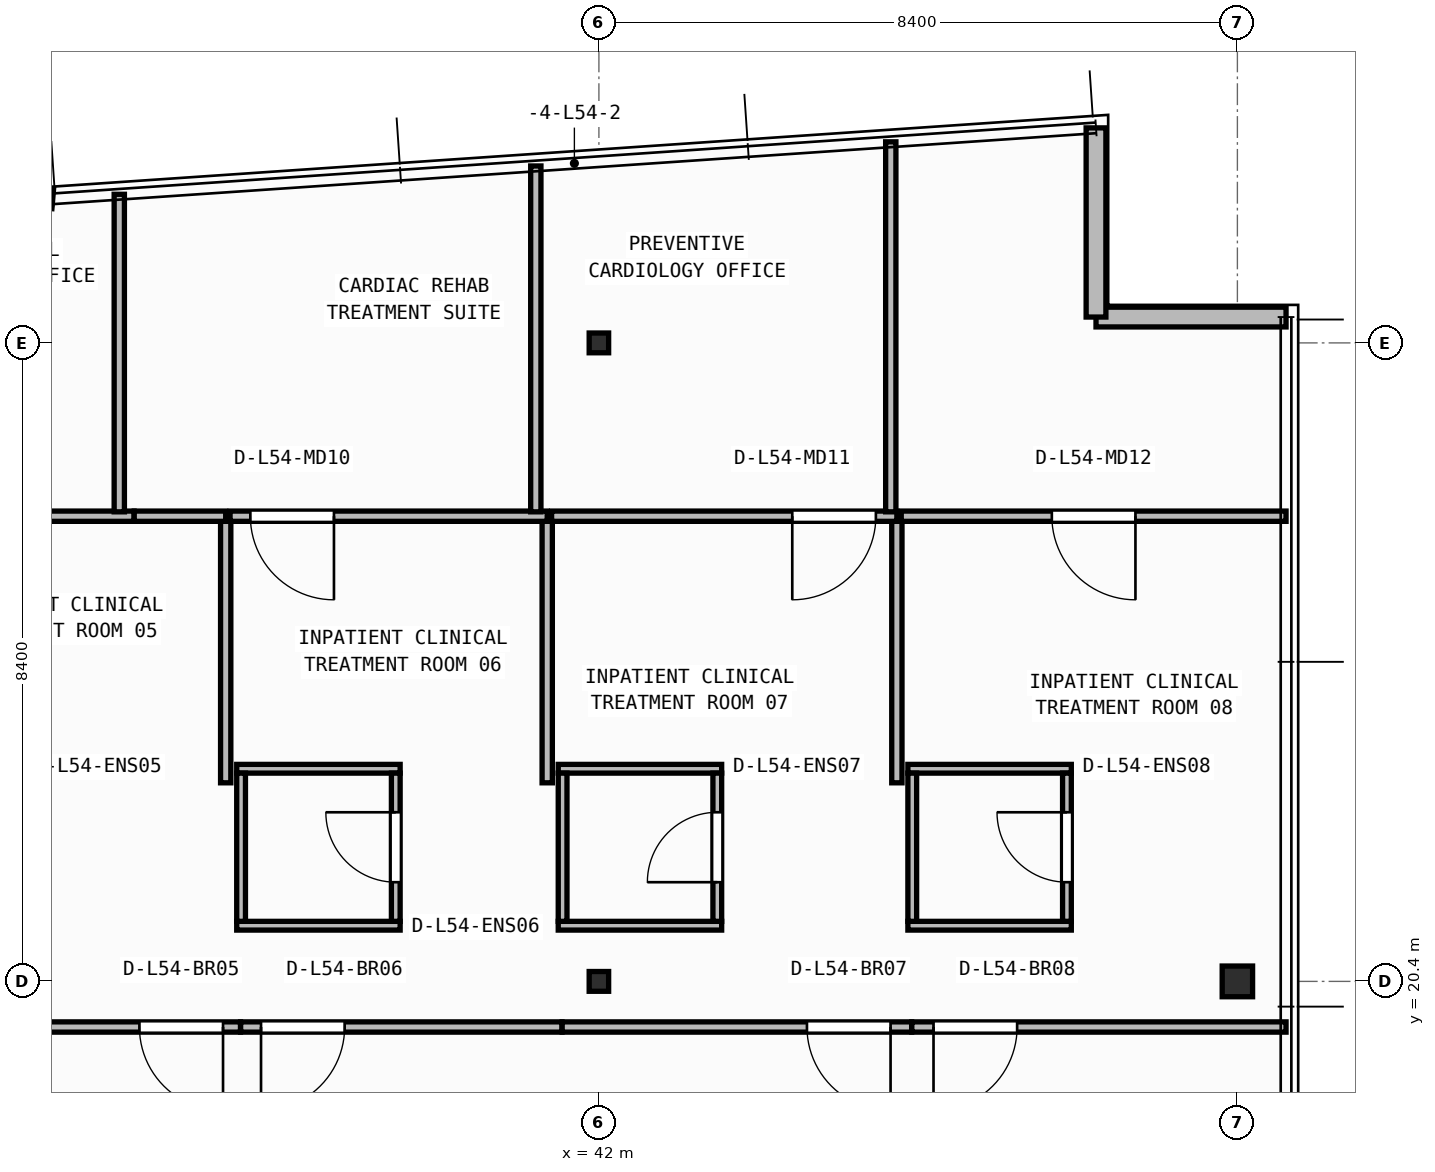
"""IFC4 building model, lengths in metres.
Left out: names, types, materials, properties, quantities, classifications, styles, units other than length and angle.
Written with IfcOpenShell. Run it as: python <this file> out.ifc"""

import sys

from ifc_helpers import new_model, si_unit, direction, frame, frame_2d, origin, origin_2d, place, context, subcontext, project, spatial, rectangle, i_section, extrude, element, fill, save


model = new_model("IFC4")
c1 = context("Model", 3, precision=1e-05, world=origin(), true_north=direction((0.0, 1.0)))
c2 = subcontext(c1, "Body", "Model", "MODEL_VIEW")
j1 = project(units=[si_unit("LENGTHUNIT", "METRE"), si_unit("PLANEANGLEUNIT", "RADIAN")], contexts=[c1])
p1 = place(None, origin())
s1 = spatial("IfcSite", under=j1, at=p1, CompositionType="ELEMENT")
p2 = place(p1, origin())
s2 = spatial("IfcBuilding", under=s1, at=p2, CompositionType="ELEMENT")
p3 = place(p2, frame((0.0, 0.0, 219.75)))
s3 = spatial("IfcBuildingStorey", under=s2, at=p3, CompositionType="ELEMENT", Elevation=219.75)
p4 = place(p3, frame((42.0, 20.4, 0.0), z_axis=(0.0, 0.0, 1.0), x_axis=(1.0, 0.0, 0.0)))
e1 = element("IfcColumn", 1, at=p4, inside=s3, PredefinedType="COLUMN", context=c2, shape_type="SweptSolid", body=[
    extrude(i_section(OverallWidth=0.256, OverallDepth=0.26, WebThickness=0.01, FlangeThickness=0.017, FilletRadius=0.013, at=origin_2d()), origin(), (0.0, 0.0, 1.0), 3.95),
])
p5 = place(p3, frame((50.4, 20.4, 0.0), z_axis=(0.0, 0.0, 1.0), x_axis=(1.0, 0.0, 0.0)))
e2 = element("IfcColumn", 2, at=p5, inside=s3, PredefinedType="COLUMN", context=c2, shape_type="SweptSolid", body=[
    extrude(i_section(OverallWidth=0.4, OverallDepth=0.404, WebThickness=0.02, FlangeThickness=0.032, at=origin_2d()), origin(), (0.0, 0.0, 1.0), 3.95),
])
p6 = place(p3, frame((42.0, 28.8, 0.0), z_axis=(0.0, 0.0, 1.0), x_axis=(1.0, 0.0, 0.0)))
e3 = element("IfcColumn", 3, at=p6, inside=s3, PredefinedType="COLUMN", context=c2, shape_type="SweptSolid", body=[
    extrude(i_section(OverallWidth=0.256, OverallDepth=0.26, WebThickness=0.01, FlangeThickness=0.017, FilletRadius=0.013, at=origin_2d()), origin(), (0.0, 0.0, 1.0), 3.95),
])
p7 = place(p3, frame((51.04, 29.14, 0.0), z_axis=(0.0, 0.0, 1.0), x_axis=(-1.0, 0.0, 0.0)))
e4 = element("IfcWall", 4, at=p7, inside=s3, PredefinedType="STANDARD", context=c2, shape_type="SweptSolid", body=[
    extrude(rectangle(XDim=2.5, YDim=0.26, at=frame_2d((1.25, 0.0))), origin(), (0.0, 0.0, 1.0), 3.71),
])
p8 = place(p3, frame((48.54, 29.14, 0.0), z_axis=(0.0, 0.0, 1.0), x_axis=(0.0, 1.0, 0.0)))
e5 = element("IfcWall", 5, at=p8, inside=s3, PredefinedType="STANDARD", context=c2, shape_type="SweptSolid", body=[
    extrude(rectangle(XDim=2.489, YDim=0.26, at=frame_2d((1.245, 0.0))), origin(), (0.0, 0.0, 1.0), 3.71),
])
p9 = place(p3, frame((34.815, 30.696, 0.0), z_axis=(0.0, 0.0, 1.0), x_axis=(-0.996454704935, 0.084130975344, 0.0)))
e6 = element("IfcWall", 6, at=p9, inside=s3, PredefinedType="STANDARD", context=c2, shape_type="SweptSolid", body=[
    extrude(rectangle(XDim=13.401, YDim=0.26, at=frame_2d((6.701, 0.0))), origin(), (0.0, 0.0, 1.0), 3.71),
])
p10 = place(p9, frame((5.5, 0.0, 0.9)))
e7 = element("IfcOpeningElement", 7, at=p10, cuts=e6, PredefinedType="OPENING", context=c2, shape_type="SweptSolid", body=[
    extrude(rectangle(XDim=2.4, YDim=1.65, at=frame_2d((1.2, 0.825))), frame((0.0, 0.14, 0.0), z_axis=(0.0, -1.0, 0.0), x_axis=(1.0, 0.0, 0.0)), (0.0, 0.0, 1.0), 0.28),
])
for number, where, z_axis, x_axis in (
    (8, (37.235, 21.133, 0.0), (0.0, 0.0, 1.0), (1.0, 0.0, 0.0)),
    (9, (37.235, 23.198, 0.0), (0.0, 0.0, 1.0), (1.0, 0.0, 0.0)),
):
    element("IfcWall", number, at=place(p3, frame(where, z_axis=z_axis, x_axis=x_axis)), inside=s3, PredefinedType="PARTITIONING", context=c2, shape_type="SweptSolid", body=[
        extrude(rectangle(XDim=2.15, YDim=0.115, at=frame_2d((1.075, 0.0))), origin(), (0.0, 0.0, 1.0), 3.71),
    ])
p11 = place(p3, frame((37.292, 21.19, 0.0), z_axis=(0.0, 0.0, 1.0), x_axis=(0.0, 1.0, 0.0)))
e10 = element("IfcWall", 10, at=p11, inside=s3, PredefinedType="PARTITIONING", context=c2, shape_type="SweptSolid", body=[
    extrude(rectangle(XDim=1.95, YDim=0.115, at=frame_2d((0.975, 0.0))), origin(), (0.0, 0.0, 1.0), 3.71),
])
p12 = place(p3, frame((39.327, 21.19, 0.0), z_axis=(0.0, 0.0, 1.0), x_axis=(0.0, 1.0, 0.0)))
e11 = element("IfcWall", 11, at=p12, inside=s3, PredefinedType="PARTITIONING", context=c2, shape_type="SweptSolid", body=[
    extrude(rectangle(XDim=1.95, YDim=0.115, at=frame_2d((0.975, 0.0))), origin(), (0.0, 0.0, 1.0), 3.71),
])
p13 = place(p12, frame((0.515, 0.0, 0.0)))
e12 = element("IfcOpeningElement", 12, at=p13, cuts=e11, PredefinedType="OPENING", context=c2, shape_type="SweptSolid", body=[
    extrude(rectangle(XDim=0.92, YDim=2.1, at=frame_2d((0.46, 1.05))), frame((0.0, 0.067, 0.0), z_axis=(0.0, -1.0, 0.0), x_axis=(1.0, 0.0, 0.0)), (0.0, 0.0, 1.0), 0.135),
])
for number, where, z_axis, x_axis in (
    (13, (41.465, 21.133, 0.0), (0.0, 0.0, 1.0), (1.0, 0.0, 0.0)),
    (14, (41.465, 23.198, 0.0), (0.0, 0.0, 1.0), (1.0, 0.0, 0.0)),
):
    element("IfcWall", number, at=place(p3, frame(where, z_axis=z_axis, x_axis=x_axis)), inside=s3, PredefinedType="PARTITIONING", context=c2, shape_type="SweptSolid", body=[
        extrude(rectangle(XDim=2.15, YDim=0.115, at=frame_2d((1.075, 0.0))), origin(), (0.0, 0.0, 1.0), 3.71),
    ])
p14 = place(p3, frame((41.522, 21.19, 0.0), z_axis=(0.0, 0.0, 1.0), x_axis=(0.0, 1.0, 0.0)))
e15 = element("IfcWall", 15, at=p14, inside=s3, PredefinedType="PARTITIONING", context=c2, shape_type="SweptSolid", body=[
    extrude(rectangle(XDim=1.95, YDim=0.115, at=frame_2d((0.975, 0.0))), origin(), (0.0, 0.0, 1.0), 3.157),
])
p15 = place(p3, frame((43.558, 21.19, 0.0), z_axis=(0.0, 0.0, 1.0), x_axis=(0.0, 1.0, 0.0)))
e16 = element("IfcWall", 16, at=p15, inside=s3, PredefinedType="PARTITIONING", context=c2, shape_type="SweptSolid", body=[
    extrude(rectangle(XDim=1.95, YDim=0.115, at=frame_2d((0.975, 0.0))), origin(), (0.0, 0.0, 1.0), 3.71),
])
p16 = place(p15, frame((0.515, 0.0, 0.0)))
e17 = element("IfcOpeningElement", 17, at=p16, cuts=e16, PredefinedType="OPENING", context=c2, shape_type="SweptSolid", body=[
    extrude(rectangle(XDim=0.92, YDim=2.1, at=frame_2d((0.46, 1.05))), frame((0.0, 0.067, 0.0), z_axis=(0.0, -1.0, 0.0), x_axis=(1.0, 0.0, 0.0)), (0.0, 0.0, 1.0), 0.135),
])
for number, where, z_axis, x_axis in (
    (18, (46.065, 21.133, 0.0), (0.0, 0.0, 1.0), (1.0, 0.0, 0.0)),
    (19, (46.065, 23.198, 0.0), (0.0, 0.0, 1.0), (1.0, 0.0, 0.0)),
):
    element("IfcWall", number, at=place(p3, frame(where, z_axis=z_axis, x_axis=x_axis)), inside=s3, PredefinedType="PARTITIONING", context=c2, shape_type="SweptSolid", body=[
        extrude(rectangle(XDim=2.15, YDim=0.115, at=frame_2d((1.075, 0.0))), origin(), (0.0, 0.0, 1.0), 3.71),
    ])
p17 = place(p3, frame((46.123, 21.19, 0.0), z_axis=(0.0, 0.0, 1.0), x_axis=(0.0, 1.0, 0.0)))
e20 = element("IfcWall", 20, at=p17, inside=s3, PredefinedType="PARTITIONING", context=c2, shape_type="SweptSolid", body=[
    extrude(rectangle(XDim=1.95, YDim=0.115, at=frame_2d((0.975, 0.0))), origin(), (0.0, 0.0, 1.0), 3.71),
])
p18 = place(p3, frame((48.157, 21.19, 0.0), z_axis=(0.0, 0.0, 1.0), x_axis=(0.0, 1.0, 0.0)))
e21 = element("IfcWall", 21, at=p18, inside=s3, PredefinedType="PARTITIONING", context=c2, shape_type="SweptSolid", body=[
    extrude(rectangle(XDim=1.95, YDim=0.115, at=frame_2d((0.975, 0.0))), origin(), (0.0, 0.0, 1.0), 3.71),
])
p19 = place(p18, frame((0.515, 0.0, 0.0)))
e22 = element("IfcOpeningElement", 22, at=p19, cuts=e21, PredefinedType="OPENING", context=c2, shape_type="SweptSolid", body=[
    extrude(rectangle(XDim=0.92, YDim=2.1, at=frame_2d((0.46, 1.05))), frame((0.0, 0.067, 0.0), z_axis=(0.0, -1.0, 0.0), x_axis=(1.0, 0.0, 0.0)), (0.0, 0.0, 1.0), 0.135),
])
p20 = place(p3, frame((37.285, 19.8, 0.0), z_axis=(0.0, 0.0, 1.0), x_axis=(-1.0, 0.0, 0.0)))
e23 = element("IfcWall", 23, at=p20, inside=s3, PredefinedType="PARTITIONING", context=c2, shape_type="SweptSolid", body=[
    extrude(rectangle(XDim=2.687, YDim=0.135, at=frame_2d((1.344, 0.0))), origin(), (0.0, 0.0, 1.0), 3.71),
])
p21 = place(p20, frame((0.23, 0.0, 0.0)))
e24 = element("IfcOpeningElement", 24, at=p21, cuts=e23, PredefinedType="OPENING", context=c2, shape_type="SweptSolid", body=[
    extrude(rectangle(XDim=1.1, YDim=2.1, at=frame_2d((0.55, 1.05))), frame((0.0, 0.077, 0.0), z_axis=(0.0, -1.0, 0.0), x_axis=(1.0, 0.0, 0.0)), (0.0, 0.0, 1.0), 0.155),
])
p22 = place(p3, frame((41.515, 19.8, 0.0), z_axis=(0.0, 0.0, 1.0), x_axis=(-1.0, 0.0, 0.0)))
e25 = element("IfcWall", 25, at=p22, inside=s3, PredefinedType="PARTITIONING", context=c2, shape_type="SweptSolid", body=[
    extrude(rectangle(XDim=4.228, YDim=0.135, at=frame_2d((2.114, 0.0))), origin(), (0.0, 0.0, 1.0), 3.71),
])
p23 = place(p22, frame((2.86, 0.0, 0.0)))
e26 = element("IfcOpeningElement", 26, at=p23, cuts=e25, PredefinedType="OPENING", context=c2, shape_type="SweptSolid", body=[
    extrude(rectangle(XDim=1.1, YDim=2.1, at=frame_2d((0.55, 1.05))), frame((0.0, 0.077, 0.0), z_axis=(0.0, -1.0, 0.0), x_axis=(1.0, 0.0, 0.0)), (0.0, 0.0, 1.0), 0.155),
])
p24 = place(p3, frame((46.115, 19.8, 0.0), z_axis=(0.0, 0.0, 1.0), x_axis=(-1.0, 0.0, 0.0)))
e27 = element("IfcWall", 27, at=p24, inside=s3, PredefinedType="PARTITIONING", context=c2, shape_type="SweptSolid", body=[
    extrude(rectangle(XDim=4.598, YDim=0.135, at=frame_2d((2.299, 0.0))), origin(), (0.0, 0.0, 1.0), 3.71),
])
p25 = place(p24, frame((0.278, 0.0, 0.0)))
e28 = element("IfcOpeningElement", 28, at=p25, cuts=e27, PredefinedType="OPENING", context=c2, shape_type="SweptSolid", body=[
    extrude(rectangle(XDim=1.1, YDim=2.1, at=frame_2d((0.55, 1.05))), frame((0.0, 0.077, 0.0), z_axis=(0.0, -1.0, 0.0), x_axis=(1.0, 0.0, 0.0)), (0.0, 0.0, 1.0), 0.155),
])
p26 = place(p3, frame((51.04, 19.8, 0.0), z_axis=(0.0, 0.0, 1.0), x_axis=(-1.0, 0.0, 0.0)))
e29 = element("IfcWall", 29, at=p26, inside=s3, PredefinedType="PARTITIONING", context=c2, shape_type="SweptSolid", body=[
    extrude(rectangle(XDim=4.923, YDim=0.135, at=frame_2d((2.462, 0.0))), origin(), (0.0, 0.0, 1.0), 3.71),
])
p27 = place(p26, frame((3.538, 0.0, 0.0)))
e30 = element("IfcOpeningElement", 30, at=p27, cuts=e29, PredefinedType="OPENING", context=c2, shape_type="SweptSolid", body=[
    extrude(rectangle(XDim=1.1, YDim=2.1, at=frame_2d((0.55, 1.05))), frame((0.0, 0.077, 0.0), z_axis=(0.0, -1.0, 0.0), x_axis=(1.0, 0.0, 0.0)), (0.0, 0.0, 1.0), 0.155),
])
p28 = place(p3, frame((37.09, 23.012, 0.0), z_axis=(0.0, 0.0, 1.0), x_axis=(0.0, 1.0, 0.0)))
e31 = element("IfcWall", 31, at=p28, inside=s3, PredefinedType="PARTITIONING", context=c2, shape_type="SweptSolid", body=[
    extrude(rectangle(XDim=3.508, YDim=0.135, at=frame_2d((1.754, 0.0))), origin(), (0.0, 0.0, 1.0), 3.71),
])
p29 = place(p3, frame((35.885, 26.52, 0.0), z_axis=(0.0, 0.0, 1.0), x_axis=(-1.0, 0.0, 0.0)))
e32 = element("IfcWall", 32, at=p29, inside=s3, PredefinedType="PARTITIONING", context=c2, shape_type="SweptSolid", body=[
    extrude(rectangle(XDim=3.707, YDim=0.135, at=frame_2d((1.854, 0.0))), origin(), (0.0, 0.0, 1.0), 3.71),
])
p30 = place(p3, frame((37.09, 26.52, 0.0), z_axis=(0.0, 0.0, 1.0), x_axis=(-1.0, 0.0, 0.0)))
e33 = element("IfcWall", 33, at=p30, inside=s3, PredefinedType="PARTITIONING", context=c2, shape_type="SweptSolid", body=[
    extrude(rectangle(XDim=1.203, YDim=0.135, at=frame_2d((0.602, 0.0))), origin(), (0.0, 0.0, 1.0), 3.71),
])
p31 = place(p3, frame((41.32, 23.012, 0.0), z_axis=(0.0, 0.0, 1.0), x_axis=(0.0, 1.0, 0.0)))
e34 = element("IfcWall", 34, at=p31, inside=s3, PredefinedType="PARTITIONING", context=c2, shape_type="SweptSolid", body=[
    extrude(rectangle(XDim=3.508, YDim=0.135, at=frame_2d((1.754, 0.0))), origin(), (0.0, 0.0, 1.0), 3.71),
])
p32 = place(p3, frame((41.32, 26.52, 0.0), z_axis=(0.0, 0.0, 1.0), x_axis=(-1.0, 0.0, 0.0)))
e35 = element("IfcWall", 35, at=p32, inside=s3, PredefinedType="PARTITIONING", context=c2, shape_type="SweptSolid", body=[
    extrude(rectangle(XDim=4.173, YDim=0.135, at=frame_2d((2.086, 0.0))), origin(), (0.0, 0.0, 1.0), 3.71),
])
p33 = place(p32, frame((2.806, 0.0, 0.0)))
e36 = element("IfcOpeningElement", 36, at=p33, cuts=e35, PredefinedType="OPENING", context=c2, shape_type="SweptSolid", body=[
    extrude(rectangle(XDim=1.1, YDim=2.1, at=frame_2d((0.55, 1.05))), frame((0.0, 0.077, 0.0), z_axis=(0.0, -1.0, 0.0), x_axis=(1.0, 0.0, 0.0)), (0.0, 0.0, 1.0), 0.155),
])
p34 = place(p3, frame((45.92, 23.012, 0.0), z_axis=(0.0, 0.0, 1.0), x_axis=(0.0, 1.0, 0.0)))
e37 = element("IfcWall", 37, at=p34, inside=s3, PredefinedType="PARTITIONING", context=c2, shape_type="SweptSolid", body=[
    extrude(rectangle(XDim=3.508, YDim=0.135, at=frame_2d((1.754, 0.0))), origin(), (0.0, 0.0, 1.0), 3.71),
])
p35 = place(p3, frame((45.92, 26.52, 0.0), z_axis=(0.0, 0.0, 1.0), x_axis=(-1.0, 0.0, 0.0)))
e38 = element("IfcWall", 38, at=p35, inside=s3, PredefinedType="PARTITIONING", context=c2, shape_type="SweptSolid", body=[
    extrude(rectangle(XDim=4.542, YDim=0.135, at=frame_2d((2.271, 0.0))), origin(), (0.0, 0.0, 1.0), 3.71),
])
p36 = place(p35, frame((0.276, 0.0, 0.0)))
e39 = element("IfcOpeningElement", 39, at=p36, cuts=e38, PredefinedType="OPENING", context=c2, shape_type="SweptSolid", body=[
    extrude(rectangle(XDim=1.1, YDim=2.1, at=frame_2d((0.55, 1.05))), frame((0.0, 0.077, 0.0), z_axis=(0.0, -1.0, 0.0), x_axis=(1.0, 0.0, 0.0)), (0.0, 0.0, 1.0), 0.155),
])
p37 = place(p3, frame((51.04, 26.52, 0.0), z_axis=(0.0, 0.0, 1.0), x_axis=(-1.0, 0.0, 0.0)))
e40 = element("IfcWall", 40, at=p37, inside=s3, PredefinedType="PARTITIONING", context=c2, shape_type="SweptSolid", body=[
    extrude(rectangle(XDim=5.062, YDim=0.135, at=frame_2d((2.531, 0.0))), origin(), (0.0, 0.0, 1.0), 3.71),
])
p38 = place(p37, frame((1.981, 0.0, 0.0)))
e41 = element("IfcOpeningElement", 41, at=p38, cuts=e40, PredefinedType="OPENING", context=c2, shape_type="SweptSolid", body=[
    extrude(rectangle(XDim=1.1, YDim=2.1, at=frame_2d((0.55, 1.05))), frame((0.0, 0.077, 0.0), z_axis=(0.0, -1.0, 0.0), x_axis=(1.0, 0.0, 0.0)), (0.0, 0.0, 1.0), 0.155),
])
p39 = place(p3, frame((35.69, 26.577, 0.0), z_axis=(0.0, 0.0, 1.0), x_axis=(0.0, 1.0, 0.0)))
e42 = element("IfcWall", 42, at=p39, inside=s3, PredefinedType="PARTITIONING", context=c2, shape_type="SweptSolid", body=[
    extrude(rectangle(XDim=4.178, YDim=0.135, at=frame_2d((2.089, 0.0))), origin(), (0.0, 0.0, 1.0), 3.71),
])
p40 = place(p3, frame((41.17, 26.577, 0.0), z_axis=(0.0, 0.0, 1.0), x_axis=(0.0, 1.0, 0.0)))
e43 = element("IfcWall", 43, at=p40, inside=s3, PredefinedType="PARTITIONING", context=c2, shape_type="SweptSolid", body=[
    extrude(rectangle(XDim=4.55, YDim=0.135, at=frame_2d((2.275, 0.0))), origin(), (0.0, 0.0, 1.0), 3.71),
])
p41 = place(p3, frame((45.84, 26.577, 0.0), z_axis=(0.0, 0.0, 1.0), x_axis=(0.0, 1.0, 0.0)))
e44 = element("IfcWall", 44, at=p41, inside=s3, PredefinedType="PARTITIONING", context=c2, shape_type="SweptSolid", body=[
    extrude(rectangle(XDim=4.868, YDim=0.135, at=frame_2d((2.434, 0.0))), origin(), (0.0, 0.0, 1.0), 3.71),
])
p42 = place(p13, origin())
e45 = element("IfcDoor", 45, at=p42, inside=s3, OperationType="SINGLE_SWING_RIGHT", PredefinedType="DOOR", context=c2, shape_type="SweptSolid", body=[
    extrude(rectangle(XDim=0.92, YDim=2.1, at=frame_2d((0.46, 1.05))), frame((0.0, 0.025, 0.0), z_axis=(0.0, -1.0, 0.0), x_axis=(1.0, 0.0, 0.0)), (0.0, 0.0, 1.0), 0.05),
])
fill(e12, e45)
p43 = place(p16, origin())
e46 = element("IfcDoor", 46, at=p43, inside=s3, OperationType="SINGLE_SWING_LEFT", PredefinedType="DOOR", context=c2, shape_type="SweptSolid", body=[
    extrude(rectangle(XDim=0.92, YDim=2.1, at=frame_2d((0.46, 1.05))), frame((0.0, 0.025, 0.0), z_axis=(0.0, -1.0, 0.0), x_axis=(1.0, 0.0, 0.0)), (0.0, 0.0, 1.0), 0.05),
])
fill(e17, e46)
p44 = place(p19, origin())
e47 = element("IfcDoor", 47, at=p44, inside=s3, OperationType="SINGLE_SWING_RIGHT", PredefinedType="DOOR", context=c2, shape_type="SweptSolid", body=[
    extrude(rectangle(XDim=0.92, YDim=2.1, at=frame_2d((0.46, 1.05))), frame((0.0, 0.025, 0.0), z_axis=(0.0, -1.0, 0.0), x_axis=(1.0, 0.0, 0.0)), (0.0, 0.0, 1.0), 0.05),
])
fill(e22, e47)
p45 = place(p21, origin())
e48 = element("IfcDoor", 48, at=p45, inside=s3, OperationType="SINGLE_SWING_LEFT", PredefinedType="DOOR", context=c2, shape_type="SweptSolid", body=[
    extrude(rectangle(XDim=1.1, YDim=2.1, at=frame_2d((0.55, 1.05))), frame((0.0, 0.025, 0.0), z_axis=(0.0, -1.0, 0.0), x_axis=(1.0, 0.0, 0.0)), (0.0, 0.0, 1.0), 0.05),
])
fill(e24, e48)
p46 = place(p23, origin())
e49 = element("IfcDoor", 49, at=p46, inside=s3, OperationType="SINGLE_SWING_RIGHT", PredefinedType="DOOR", context=c2, shape_type="SweptSolid", body=[
    extrude(rectangle(XDim=1.1, YDim=2.1, at=frame_2d((0.55, 1.05))), frame((0.0, 0.025, 0.0), z_axis=(0.0, -1.0, 0.0), x_axis=(1.0, 0.0, 0.0)), (0.0, 0.0, 1.0), 0.05),
])
fill(e26, e49)
p47 = place(p25, origin())
e50 = element("IfcDoor", 50, at=p47, inside=s3, OperationType="SINGLE_SWING_LEFT", PredefinedType="DOOR", context=c2, shape_type="SweptSolid", body=[
    extrude(rectangle(XDim=1.1, YDim=2.1, at=frame_2d((0.55, 1.05))), frame((0.0, 0.025, 0.0), z_axis=(0.0, -1.0, 0.0), x_axis=(1.0, 0.0, 0.0)), (0.0, 0.0, 1.0), 0.05),
])
fill(e28, e50)
p48 = place(p27, origin())
e51 = element("IfcDoor", 51, at=p48, inside=s3, OperationType="SINGLE_SWING_RIGHT", PredefinedType="DOOR", context=c2, shape_type="SweptSolid", body=[
    extrude(rectangle(XDim=1.1, YDim=2.1, at=frame_2d((0.55, 1.05))), frame((0.0, 0.025, 0.0), z_axis=(0.0, -1.0, 0.0), x_axis=(1.0, 0.0, 0.0)), (0.0, 0.0, 1.0), 0.05),
])
fill(e30, e51)
p49 = place(p33, origin())
e52 = element("IfcDoor", 52, at=p49, inside=s3, OperationType="SINGLE_SWING_LEFT", PredefinedType="DOOR", context=c2, shape_type="SweptSolid", body=[
    extrude(rectangle(XDim=1.1, YDim=2.1, at=frame_2d((0.55, 1.05))), frame((0.0, 0.025, 0.0), z_axis=(0.0, -1.0, 0.0), x_axis=(1.0, 0.0, 0.0)), (0.0, 0.0, 1.0), 0.05),
])
fill(e36, e52)
p50 = place(p36, origin())
e53 = element("IfcDoor", 53, at=p50, inside=s3, OperationType="SINGLE_SWING_RIGHT", PredefinedType="DOOR", context=c2, shape_type="SweptSolid", body=[
    extrude(rectangle(XDim=1.1, YDim=2.1, at=frame_2d((0.55, 1.05))), frame((0.0, 0.025, 0.0), z_axis=(0.0, -1.0, 0.0), x_axis=(1.0, 0.0, 0.0)), (0.0, 0.0, 1.0), 0.05),
])
fill(e39, e53)
p51 = place(p38, origin())
e54 = element("IfcDoor", 54, at=p51, inside=s3, OperationType="SINGLE_SWING_LEFT", PredefinedType="DOOR", context=c2, shape_type="SweptSolid", body=[
    extrude(rectangle(XDim=1.1, YDim=2.1, at=frame_2d((0.55, 1.05))), frame((0.0, 0.025, 0.0), z_axis=(0.0, -1.0, 0.0), x_axis=(1.0, 0.0, 0.0)), (0.0, 0.0, 1.0), 0.05),
])
fill(e41, e54)
save(model, sys.argv[1])
